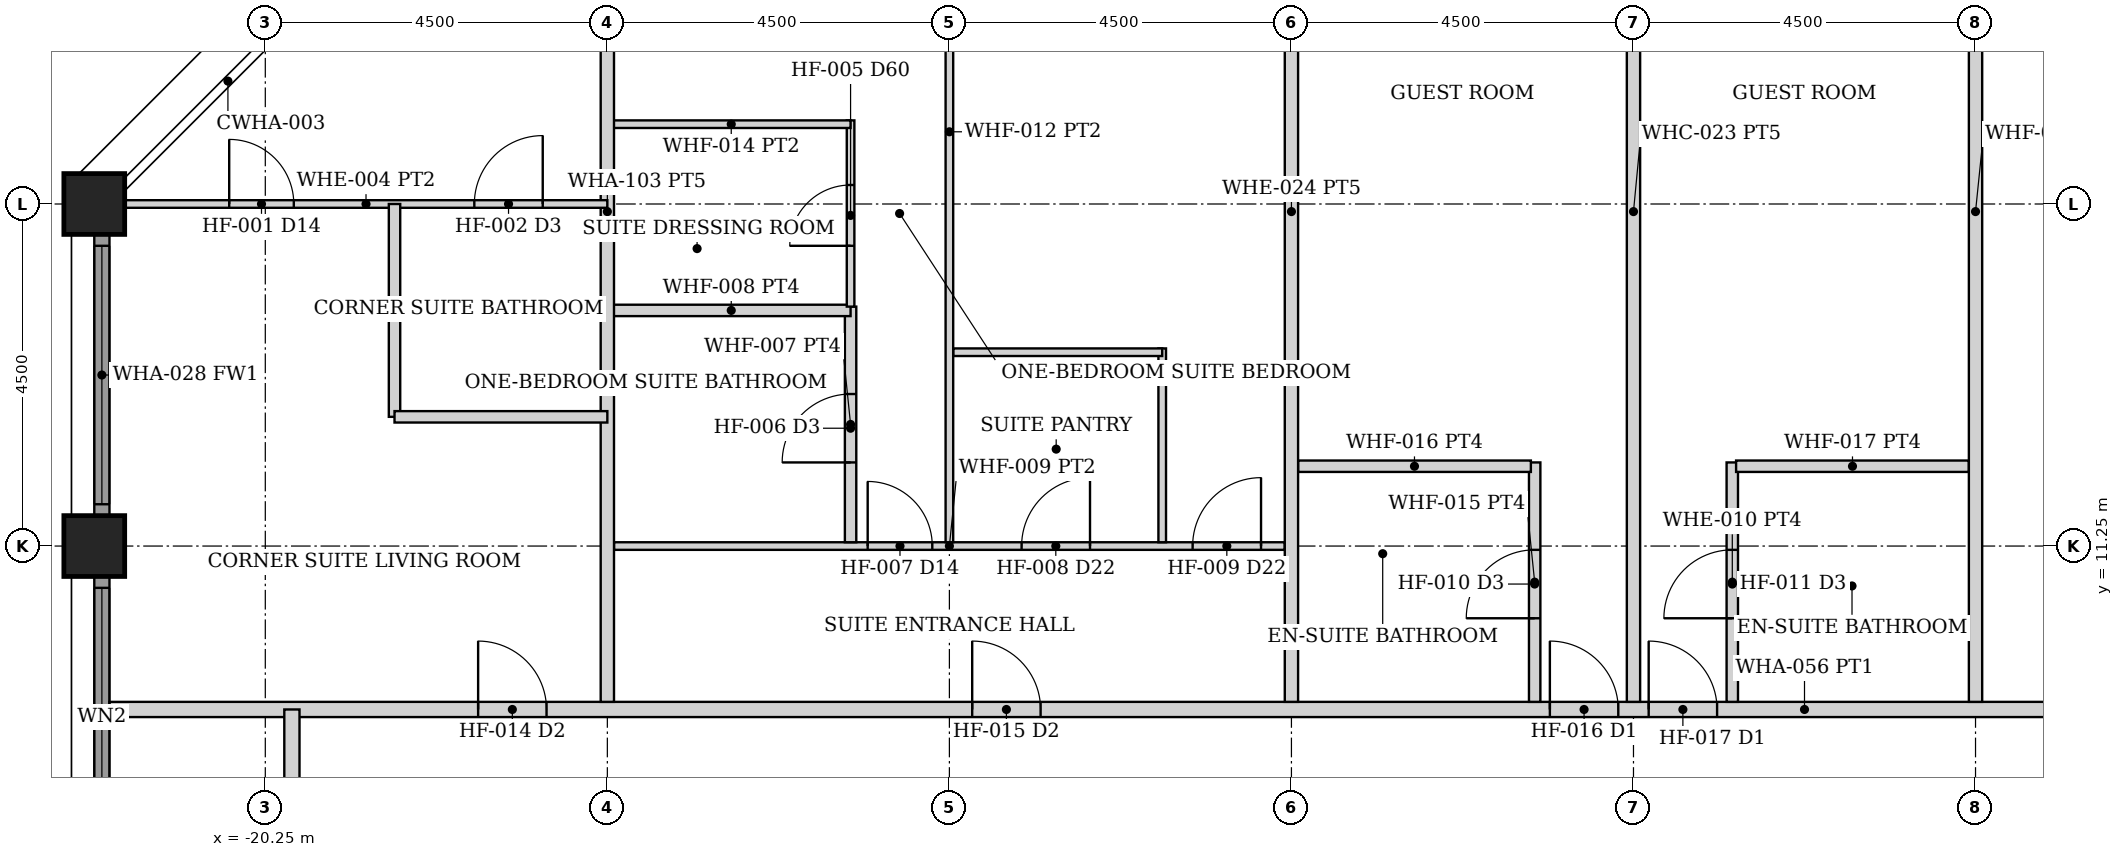
"""IFC4 building model, lengths in metres.
Left out: names, types, materials, properties, quantities, classifications, styles, units other than length and angle.
Written with IfcOpenShell. Run it as: python <this file> out.ifc"""

import sys

from ifc_helpers import new_model, si_unit, direction, frame, frame_2d, origin, origin_2d, place, context, subcontext, project, spatial, rectangle, hollow_rectangle, extrude, element, fill, save


model = new_model("IFC4")
c1 = context("Model", 3, precision=1e-05, world=origin(), true_north=direction((0.0, 1.0)))
c2 = subcontext(c1, "Body", "Model", "MODEL_VIEW")
j1 = project(units=[si_unit("LENGTHUNIT", "METRE"), si_unit("PLANEANGLEUNIT", "RADIAN")], contexts=[c1])
p1 = place(None, origin())
s1 = spatial("IfcSite", under=j1, at=p1, CompositionType="ELEMENT")
p2 = place(p1, origin())
s2 = spatial("IfcBuilding", under=s1, at=p2, CompositionType="ELEMENT")
p3 = place(p2, frame((0.0, 0.0, 172.4)))
s3 = spatial("IfcBuildingStorey", under=s2, at=p3, CompositionType="ELEMENT", Elevation=172.4)
for number, where, z_axis, x_axis in (
    (1, (-22.5, 11.25, 0.0), (0.0, 0.0, 1.0), (1.0, 0.0, 0.0)),
    (2, (-22.5, 15.75, 0.0), (0.0, 0.0, 1.0), (1.0, 0.0, 0.0)),
):
    element("IfcColumn", number, at=place(p3, frame(where, z_axis=z_axis, x_axis=x_axis)), inside=s3, PredefinedType="COLUMN", context=c2, shape_type="SweptSolid", body=[
        extrude(hollow_rectangle(XDim=0.8, YDim=0.8, WallThickness=0.045, at=origin_2d()), origin(), (0.0, 0.0, 1.0), 3.6),
    ])
p4 = place(p3, frame((-22.4, 7.155, 0.0), z_axis=(0.0, 0.0, 1.0), x_axis=(0.0, 1.0, 0.0)))
e3 = element("IfcWall", 3, at=p4, inside=s3, PredefinedType="SOLIDWALL", context=c2, shape_type="SweptSolid", body=[
    extrude(rectangle(XDim=3.69, YDim=0.2, at=frame_2d((1.845, 0.0))), origin(), (0.0, 0.0, 1.0), 2.479),
])
p5 = place(p4, frame((0.145, 0.0, 0.3)))
e4 = element("IfcOpeningElement", 4, at=p5, cuts=e3, PredefinedType="OPENING", context=c2, shape_type="SweptSolid", body=[
    extrude(rectangle(XDim=3.4, YDim=2.029, at=frame_2d((1.7, 1.015))), frame((0.0, 0.11, 0.0), z_axis=(0.0, -1.0, 0.0), x_axis=(1.0, 0.0, 0.0)), (0.0, 0.0, 1.0), 0.22),
])
p6 = place(p3, frame((-22.4, 11.655, 0.0), z_axis=(0.0, 0.0, 1.0), x_axis=(0.0, 1.0, 0.0)))
e5 = element("IfcWall", 5, at=p6, inside=s3, PredefinedType="SOLIDWALL", context=c2, shape_type="SweptSolid", body=[
    extrude(rectangle(XDim=3.69, YDim=0.2, at=frame_2d((1.845, 0.0))), origin(), (0.0, 0.0, 1.0), 2.479),
])
p7 = place(p6, frame((0.145, 0.0, 0.3)))
e6 = element("IfcOpeningElement", 6, at=p7, cuts=e5, PredefinedType="OPENING", context=c2, shape_type="SweptSolid", body=[
    extrude(rectangle(XDim=3.4, YDim=2.029, at=frame_2d((1.7, 1.015))), frame((0.0, 0.11, 0.0), z_axis=(0.0, -1.0, 0.0), x_axis=(1.0, 0.0, 0.0)), (0.0, 0.0, 1.0), 0.22),
])
p8 = place(p3, frame((-22.3, 9.1, 0.0), z_axis=(0.0, 0.0, 1.0), x_axis=(1.0, 0.0, 0.0)))
e7 = element("IfcWall", 7, at=p8, inside=s3, PredefinedType="PARTITIONING", context=c2, shape_type="SweptSolid", body=[
    extrude(rectangle(XDim=44.6, YDim=0.2, at=frame_2d((22.3, 0.0))), origin(), (0.0, 0.0, 1.0), 2.473),
])
p9 = place(p8, frame((11.35, 0.0, 0.0)))
e8 = element("IfcOpeningElement", 8, at=p9, cuts=e7, PredefinedType="OPENING", context=c2, shape_type="SweptSolid", body=[
    extrude(rectangle(XDim=0.9, YDim=2.1, at=frame_2d((0.45, 1.05))), frame((0.0, 0.11, 0.0), z_axis=(0.0, -1.0, 0.0), x_axis=(1.0, 0.0, 0.0)), (0.0, 0.0, 1.0), 0.22),
])
p10 = place(p8, frame((18.95, 0.0, 0.0)))
e9 = element("IfcOpeningElement", 9, at=p10, cuts=e7, PredefinedType="OPENING", context=c2, shape_type="SweptSolid", body=[
    extrude(rectangle(XDim=0.9, YDim=2.1, at=frame_2d((0.45, 1.05))), frame((0.0, 0.11, 0.0), z_axis=(0.0, -1.0, 0.0), x_axis=(1.0, 0.0, 0.0)), (0.0, 0.0, 1.0), 0.22),
])
p11 = place(p8, frame((20.25, 0.0, 0.0)))
e10 = element("IfcOpeningElement", 10, at=p11, cuts=e7, PredefinedType="OPENING", context=c2, shape_type="SweptSolid", body=[
    extrude(rectangle(XDim=0.9, YDim=2.1, at=frame_2d((0.45, 1.05))), frame((0.0, 0.11, 0.0), z_axis=(0.0, -1.0, 0.0), x_axis=(1.0, 0.0, 0.0)), (0.0, 0.0, 1.0), 0.22),
])
p12 = place(p8, frame((32.45, 0.0, 0.0)))
e11 = element("IfcOpeningElement", 11, at=p12, cuts=e7, PredefinedType="OPENING", context=c2, shape_type="SweptSolid", body=[
    extrude(rectangle(XDim=0.9, YDim=2.1, at=frame_2d((0.45, 1.05))), frame((0.0, 0.11, 0.0), z_axis=(0.0, -1.0, 0.0), x_axis=(1.0, 0.0, 0.0)), (0.0, 0.0, 1.0), 0.22),
])
p13 = place(p8, frame((36.95, 0.0, 0.0)))
e12 = element("IfcOpeningElement", 12, at=p13, cuts=e7, PredefinedType="OPENING", context=c2, shape_type="SweptSolid", body=[
    extrude(rectangle(XDim=0.9, YDim=2.1, at=frame_2d((0.45, 1.05))), frame((0.0, 0.11, 0.0), z_axis=(0.0, -1.0, 0.0), x_axis=(1.0, 0.0, 0.0)), (0.0, 0.0, 1.0), 0.22),
])
p14 = place(p8, frame((38.85, 0.0, 0.0)))
e13 = element("IfcOpeningElement", 13, at=p14, cuts=e7, PredefinedType="OPENING", context=c2, shape_type="SweptSolid", body=[
    extrude(rectangle(XDim=0.9, YDim=2.1, at=frame_2d((0.45, 1.05))), frame((0.0, 0.11, 0.0), z_axis=(0.0, -1.0, 0.0), x_axis=(1.0, 0.0, 0.0)), (0.0, 0.0, 1.0), 0.22),
])
p15 = place(p8, frame((4.85, 0.0, 0.0)))
e14 = element("IfcOpeningElement", 14, at=p15, cuts=e7, PredefinedType="OPENING", context=c2, shape_type="SweptSolid", body=[
    extrude(rectangle(XDim=0.9, YDim=2.1, at=frame_2d((0.45, 1.05))), frame((0.0, 0.11, 0.0), z_axis=(0.0, -1.0, 0.0), x_axis=(1.0, 0.0, 0.0)), (0.0, 0.0, 1.0), 0.22),
])
p16 = place(p3, frame((-19.9, 2.2, 0.0), z_axis=(0.0, 0.0, 1.0), x_axis=(0.0, 1.0, 0.0)))
e15 = element("IfcWall", 15, at=p16, inside=s3, PredefinedType="PARTITIONING", context=c2, shape_type="SweptSolid", body=[
    extrude(rectangle(XDim=6.9, YDim=0.2, at=frame_2d((3.45, 0.0))), origin(), (0.0, 0.0, 1.0), 2.473),
])
p17 = place(p16, frame((2.925, 0.0, 0.0)))
e16 = element("IfcOpeningElement", 16, at=p17, cuts=e15, PredefinedType="OPENING", context=c2, shape_type="SweptSolid", body=[
    extrude(rectangle(XDim=1.0, YDim=2.1, at=frame_2d((0.5, 1.05))), frame((0.0, 0.11, 0.0), z_axis=(0.0, -1.0, 0.0), x_axis=(1.0, 0.0, 0.0)), (0.0, 0.0, 1.0), 0.22),
])
p18 = place(p3, frame((-15.663, 11.25, 0.0), z_axis=(0.0, 0.0, 1.0), x_axis=(1.0, 0.0, 0.0)))
e17 = element("IfcWall", 17, at=p18, inside=s3, PredefinedType="PARTITIONING", context=c2, shape_type="SweptSolid", body=[
    extrude(rectangle(XDim=8.825, YDim=0.1, at=frame_2d((4.413, 0.0))), origin(), (0.0, 0.0, 1.0), 2.473),
])
p19 = place(p18, frame((5.363, 0.0, 0.0)))
e18 = element("IfcOpeningElement", 18, at=p19, cuts=e17, PredefinedType="OPENING", context=c2, shape_type="SweptSolid", body=[
    extrude(rectangle(XDim=0.9, YDim=2.1, at=frame_2d((0.45, 1.05))), frame((0.0, 0.06, 0.0), z_axis=(0.0, -1.0, 0.0), x_axis=(1.0, 0.0, 0.0)), (0.0, 0.0, 1.0), 0.12),
])
p20 = place(p18, frame((7.613, 0.0, 0.0)))
e19 = element("IfcOpeningElement", 19, at=p20, cuts=e17, PredefinedType="OPENING", context=c2, shape_type="SweptSolid", body=[
    extrude(rectangle(XDim=0.9, YDim=2.1, at=frame_2d((0.45, 1.05))), frame((0.0, 0.06, 0.0), z_axis=(0.0, -1.0, 0.0), x_axis=(1.0, 0.0, 0.0)), (0.0, 0.0, 1.0), 0.12),
])
p21 = place(p18, frame((3.337, 0.0, 0.0)))
e20 = element("IfcOpeningElement", 20, at=p21, cuts=e17, PredefinedType="OPENING", context=c2, shape_type="SweptSolid", body=[
    extrude(rectangle(XDim=0.85, YDim=2.1, at=frame_2d((0.425, 1.05))), frame((0.0, 0.06, 0.0), z_axis=(0.0, -1.0, 0.0), x_axis=(1.0, 0.0, 0.0)), (0.0, 0.0, 1.0), 0.12),
])
p22 = place(p3, frame((-8.45, 11.3, 0.0), z_axis=(0.0, 0.0, 1.0), x_axis=(0.0, 1.0, 0.0)))
e21 = element("IfcWall", 21, at=p22, inside=s3, PredefinedType="PARTITIONING", context=c2, shape_type="SweptSolid", body=[
    extrude(rectangle(XDim=2.55, YDim=0.1, at=frame_2d((1.275, 0.0))), origin(), (0.0, 0.0, 1.0), 2.473),
])
p23 = place(p3, frame((-11.2, 13.8, 0.0), z_axis=(0.0, 0.0, 1.0), x_axis=(1.0, 0.0, 0.0)))
e22 = element("IfcWall", 22, at=p23, inside=s3, PredefinedType="PARTITIONING", context=c2, shape_type="SweptSolid", body=[
    extrude(rectangle(XDim=2.75, YDim=0.1, at=frame_2d((1.375, 0.0))), origin(), (0.0, 0.0, 1.0), 2.473),
])
p24 = place(p3, frame((-11.25, 11.3, 0.0), z_axis=(0.0, 0.0, 1.0), x_axis=(0.0, 1.0, 0.0)))
e23 = element("IfcWall", 23, at=p24, inside=s3, PredefinedType="PARTITIONING", context=c2, shape_type="SweptSolid", body=[
    extrude(rectangle(XDim=10.8, YDim=0.1, at=frame_2d((5.4, 0.0))), origin(), (0.0, 0.0, 1.0), 2.473),
])
p25 = place(p3, frame((-12.55, 11.3, 0.0), z_axis=(0.0, 0.0, 1.0), x_axis=(0.0, 1.0, 0.0)))
e24 = element("IfcWall", 24, at=p25, inside=s3, PredefinedType="PARTITIONING", context=c2, shape_type="SweptSolid", body=[
    extrude(rectangle(XDim=3.1, YDim=0.15, at=frame_2d((1.55, 0.0))), origin(), (0.0, 0.0, 1.0), 2.473),
])
p26 = place(p25, frame((1.05, 0.0, 0.0)))
e25 = element("IfcOpeningElement", 25, at=p26, cuts=e24, PredefinedType="OPENING", context=c2, shape_type="SweptSolid", body=[
    extrude(rectangle(XDim=0.9, YDim=2.1, at=frame_2d((0.45, 1.05))), frame((0.0, 0.085, 0.0), z_axis=(0.0, -1.0, 0.0), x_axis=(1.0, 0.0, 0.0)), (0.0, 0.0, 1.0), 0.17),
])
p27 = place(p3, frame((-15.69, 14.35, 0.0), z_axis=(0.0, 0.0, 1.0), x_axis=(1.0, 0.0, 0.0)))
e26 = element("IfcWall", 26, at=p27, inside=s3, PredefinedType="PARTITIONING", context=c2, shape_type="SweptSolid", body=[
    extrude(rectangle(XDim=3.14, YDim=0.15, at=frame_2d((1.57, 0.0))), origin(), (0.0, 0.0, 1.0), 2.473),
])
p28 = place(p3, frame((-12.55, 14.4, 0.0), z_axis=(0.0, 0.0, 1.0), x_axis=(0.0, 1.0, 0.0)))
e27 = element("IfcWall", 27, at=p28, inside=s3, PredefinedType="PARTITIONING", context=c2, shape_type="SweptSolid", body=[
    extrude(rectangle(XDim=2.45, YDim=0.1, at=frame_2d((1.225, 0.0))), origin(), (0.0, 0.0, 1.0), 2.473),
])
p29 = place(p28, frame((0.8, 0.0, 0.0)))
e28 = element("IfcOpeningElement", 28, at=p29, cuts=e27, PredefinedType="OPENING", context=c2, shape_type="SweptSolid", body=[
    extrude(rectangle(XDim=0.8, YDim=2.1, at=frame_2d((0.4, 1.05))), frame((0.0, 0.06, 0.0), z_axis=(0.0, -1.0, 0.0), x_axis=(1.0, 0.0, 0.0)), (0.0, 0.0, 1.0), 0.12),
])
p30 = place(p3, frame((-15.69, 16.8, 0.0), z_axis=(0.0, 0.0, 1.0), x_axis=(1.0, 0.0, 0.0)))
e29 = element("IfcWall", 29, at=p30, inside=s3, PredefinedType="PARTITIONING", context=c2, shape_type="SweptSolid", body=[
    extrude(rectangle(XDim=3.14, YDim=0.1, at=frame_2d((1.57, 0.0))), origin(), (0.0, 0.0, 1.0), 2.473),
])
p31 = place(p3, frame((-3.55, 9.2, 0.0), z_axis=(0.0, 0.0, 1.0), x_axis=(0.0, 1.0, 0.0)))
e30 = element("IfcWall", 30, at=p31, inside=s3, PredefinedType="PARTITIONING", context=c2, shape_type="SweptSolid", body=[
    extrude(rectangle(XDim=3.15, YDim=0.15, at=frame_2d((1.575, 0.0))), origin(), (0.0, 0.0, 1.0), 2.473),
])
p32 = place(p31, frame((1.1, 0.0, 0.0)))
e31 = element("IfcOpeningElement", 31, at=p32, cuts=e30, PredefinedType="OPENING", context=c2, shape_type="SweptSolid", body=[
    extrude(rectangle(XDim=0.9, YDim=2.1, at=frame_2d((0.45, 1.05))), frame((0.0, 0.085, 0.0), z_axis=(0.0, -1.0, 0.0), x_axis=(1.0, 0.0, 0.0)), (0.0, 0.0, 1.0), 0.17),
])
p33 = place(p3, frame((-6.663, 12.3, 0.0), z_axis=(0.0, 0.0, 1.0), x_axis=(1.0, 0.0, 0.0)))
e32 = element("IfcWall", 32, at=p33, inside=s3, PredefinedType="PARTITIONING", context=c2, shape_type="SweptSolid", body=[
    extrude(rectangle(XDim=3.062, YDim=0.15, at=frame_2d((1.531, 0.0))), origin(), (0.0, 0.0, 1.0), 2.473),
])
p34 = place(p3, frame((-0.95, 9.2, 0.0), z_axis=(0.0, 0.0, 1.0), x_axis=(0.0, 1.0, 0.0)))
e33 = element("IfcWall", 33, at=p34, inside=s3, PredefinedType="PARTITIONING", context=c2, shape_type="SweptSolid", body=[
    extrude(rectangle(XDim=3.15, YDim=0.15, at=frame_2d((1.575, 0.0))), origin(), (0.0, 0.0, 1.0), 2.473),
])
p35 = place(p34, frame((1.1, 0.0, 0.0)))
e34 = element("IfcOpeningElement", 34, at=p35, cuts=e33, PredefinedType="OPENING", context=c2, shape_type="SweptSolid", body=[
    extrude(rectangle(XDim=0.9, YDim=2.1, at=frame_2d((0.45, 1.05))), frame((0.0, 0.085, 0.0), z_axis=(0.0, -1.0, 0.0), x_axis=(1.0, 0.0, 0.0)), (0.0, 0.0, 1.0), 0.17),
])
p36 = place(p3, frame((-0.9, 12.3, 0.0), z_axis=(0.0, 0.0, 1.0), x_axis=(1.0, 0.0, 0.0)))
e35 = element("IfcWall", 35, at=p36, inside=s3, PredefinedType="PARTITIONING", context=c2, shape_type="SweptSolid", body=[
    extrude(rectangle(XDim=3.062, YDim=0.15, at=frame_2d((1.531, 0.0))), origin(), (0.0, 0.0, 1.0), 2.473),
])
for number, where, z_axis, x_axis in (
    (36, (-15.75, 9.2, 0.0), (0.0, 0.0, 1.0), (0.0, 1.0, 0.0)),
    (37, (-6.75, 9.2, 0.0), (0.0, 0.0, 1.0), (0.0, 1.0, 0.0)),
    (38, (-2.25, 9.2, 0.0), (0.0, 0.0, 1.0), (0.0, 1.0, 0.0)),
    (39, (2.25, 9.2, 0.0), (0.0, 0.0, 1.0), (0.0, 1.0, 0.0)),
):
    element("IfcWall", number, at=place(p3, frame(where, z_axis=z_axis, x_axis=x_axis)), inside=s3, PredefinedType="PARTITIONING", context=c2, shape_type="SweptSolid", body=[
        extrude(rectangle(XDim=12.9, YDim=0.175, at=frame_2d((6.45, 0.0))), origin(), (0.0, 0.0, 1.0), 2.473),
    ])
p37 = place(p3, frame((-22.1, 15.75, 0.0), z_axis=(0.0, 0.0, 1.0), x_axis=(1.0, 0.0, 0.0)))
e40 = element("IfcWall", 40, at=p37, inside=s3, PredefinedType="PARTITIONING", context=c2, shape_type="SweptSolid", body=[
    extrude(rectangle(XDim=6.35, YDim=0.1, at=frame_2d((3.175, 0.0))), origin(), (0.0, 0.0, 1.0), 2.473),
])
p38 = place(p37, frame((1.375, 0.0, 0.0)))
e41 = element("IfcOpeningElement", 41, at=p38, cuts=e40, PredefinedType="OPENING", context=c2, shape_type="SweptSolid", body=[
    extrude(rectangle(XDim=0.85, YDim=2.1, at=frame_2d((0.425, 1.05))), frame((0.0, 0.06, 0.0), z_axis=(0.0, -1.0, 0.0), x_axis=(1.0, 0.0, 0.0)), (0.0, 0.0, 1.0), 0.12),
])
p39 = place(p37, frame((4.6, 0.0, 0.0)))
e42 = element("IfcOpeningElement", 42, at=p39, cuts=e40, PredefinedType="OPENING", context=c2, shape_type="SweptSolid", body=[
    extrude(rectangle(XDim=0.9, YDim=2.1, at=frame_2d((0.45, 1.05))), frame((0.0, 0.06, 0.0), z_axis=(0.0, -1.0, 0.0), x_axis=(1.0, 0.0, 0.0)), (0.0, 0.0, 1.0), 0.12),
])
for number, where, z_axis, x_axis in (
    (43, (-18.55, 12.95, 0.0), (0.0, 0.0, 1.0), (0.0, 1.0, 0.0)),
    (44, (-18.55, 12.95, 0.0), (0.0, 0.0, 1.0), (1.0, 0.0, 0.0)),
):
    element("IfcWall", number, at=place(p3, frame(where, z_axis=z_axis, x_axis=x_axis)), inside=s3, PredefinedType="PARTITIONING", context=c2, shape_type="SweptSolid", body=[
        extrude(rectangle(XDim=2.8, YDim=0.15, at=frame_2d((1.4, 0.0))), origin(), (0.0, 0.0, 1.0), 2.473),
    ])
p40 = place(p5, origin())
e45 = element("IfcWindow", 45, at=p40, inside=s3, PartitioningType="SINGLE_PANEL", PredefinedType="WINDOW", context=c2, shape_type="SweptSolid", body=[
    extrude(rectangle(XDim=3.4, YDim=2.029, at=frame_2d((1.7, 1.015))), frame((0.0, 0.03, 0.0), z_axis=(0.0, -1.0, 0.0), x_axis=(1.0, 0.0, 0.0)), (0.0, 0.0, 1.0), 0.06),
])
fill(e4, e45)
p41 = place(p7, origin())
e46 = element("IfcWindow", 46, at=p41, inside=s3, PartitioningType="SINGLE_PANEL", PredefinedType="WINDOW", context=c2, shape_type="SweptSolid", body=[
    extrude(rectangle(XDim=3.4, YDim=2.029, at=frame_2d((1.7, 1.015))), frame((0.0, 0.03, 0.0), z_axis=(0.0, -1.0, 0.0), x_axis=(1.0, 0.0, 0.0)), (0.0, 0.0, 1.0), 0.06),
])
fill(e6, e46)
p42 = place(p9, origin())
e47 = element("IfcDoor", 47, at=p42, inside=s3, OperationType="SINGLE_SWING_LEFT", PredefinedType="DOOR", context=c2, shape_type="SweptSolid", body=[
    extrude(rectangle(XDim=0.9, YDim=2.1, at=frame_2d((0.45, 1.05))), frame((0.0, 0.025, 0.0), z_axis=(0.0, -1.0, 0.0), x_axis=(1.0, 0.0, 0.0)), (0.0, 0.0, 1.0), 0.05),
])
fill(e8, e47)
p43 = place(p19, origin())
e48 = element("IfcDoor", 48, at=p43, inside=s3, OperationType="SINGLE_SWING_RIGHT", PredefinedType="DOOR", context=c2, shape_type="SweptSolid", body=[
    extrude(rectangle(XDim=0.9, YDim=2.1, at=frame_2d((0.45, 1.05))), frame((0.0, 0.025, 0.0), z_axis=(0.0, -1.0, 0.0), x_axis=(1.0, 0.0, 0.0)), (0.0, 0.0, 1.0), 0.05),
])
fill(e18, e48)
p44 = place(p20, origin())
e49 = element("IfcDoor", 49, at=p44, inside=s3, OperationType="SINGLE_SWING_RIGHT", PredefinedType="DOOR", context=c2, shape_type="SweptSolid", body=[
    extrude(rectangle(XDim=0.9, YDim=2.1, at=frame_2d((0.45, 1.05))), frame((0.0, 0.025, 0.0), z_axis=(0.0, -1.0, 0.0), x_axis=(1.0, 0.0, 0.0)), (0.0, 0.0, 1.0), 0.05),
])
fill(e19, e49)
p45 = place(p21, origin())
e50 = element("IfcDoor", 50, at=p45, inside=s3, OperationType="SINGLE_SWING_LEFT", PredefinedType="DOOR", context=c2, shape_type="SweptSolid", body=[
    extrude(rectangle(XDim=0.85, YDim=2.1, at=frame_2d((0.425, 1.05))), frame((0.0, 0.025, 0.0), z_axis=(0.0, -1.0, 0.0), x_axis=(1.0, 0.0, 0.0)), (0.0, 0.0, 1.0), 0.05),
])
fill(e20, e50)
p46 = place(p26, origin())
e51 = element("IfcDoor", 51, at=p46, inside=s3, OperationType="SINGLE_SWING_LEFT", PredefinedType="DOOR", context=c2, shape_type="SweptSolid", body=[
    extrude(rectangle(XDim=0.9, YDim=2.1, at=frame_2d((0.45, 1.05))), frame((0.0, 0.025, 0.0), z_axis=(0.0, -1.0, 0.0), x_axis=(1.0, 0.0, 0.0)), (0.0, 0.0, 1.0), 0.05),
])
fill(e25, e51)
p47 = place(p29, origin())
e52 = element("IfcDoor", 52, at=p47, inside=s3, OperationType="SINGLE_SWING_LEFT", PredefinedType="DOOR", context=c2, shape_type="SweptSolid", body=[
    extrude(rectangle(XDim=0.8, YDim=2.1, at=frame_2d((0.4, 1.05))), frame((0.0, 0.025, 0.0), z_axis=(0.0, -1.0, 0.0), x_axis=(1.0, 0.0, 0.0)), (0.0, 0.0, 1.0), 0.05),
])
fill(e28, e52)
p48 = place(p10, origin())
e53 = element("IfcDoor", 53, at=p48, inside=s3, OperationType="SINGLE_SWING_LEFT", PredefinedType="DOOR", context=c2, shape_type="SweptSolid", body=[
    extrude(rectangle(XDim=0.9, YDim=2.1, at=frame_2d((0.45, 1.05))), frame((0.0, 0.025, 0.0), z_axis=(0.0, -1.0, 0.0), x_axis=(1.0, 0.0, 0.0)), (0.0, 0.0, 1.0), 0.05),
])
fill(e9, e53)
p49 = place(p32, origin())
e54 = element("IfcDoor", 54, at=p49, inside=s3, OperationType="SINGLE_SWING_LEFT", PredefinedType="DOOR", context=c2, shape_type="SweptSolid", body=[
    extrude(rectangle(XDim=0.9, YDim=2.1, at=frame_2d((0.45, 1.05))), frame((0.0, 0.025, 0.0), z_axis=(0.0, -1.0, 0.0), x_axis=(1.0, 0.0, 0.0)), (0.0, 0.0, 1.0), 0.05),
])
fill(e31, e54)
p50 = place(p11, origin())
e55 = element("IfcDoor", 55, at=p50, inside=s3, OperationType="SINGLE_SWING_LEFT", PredefinedType="DOOR", context=c2, shape_type="SweptSolid", body=[
    extrude(rectangle(XDim=0.9, YDim=2.1, at=frame_2d((0.45, 1.05))), frame((0.0, 0.025, 0.0), z_axis=(0.0, -1.0, 0.0), x_axis=(1.0, 0.0, 0.0)), (0.0, 0.0, 1.0), 0.05),
])
fill(e10, e55)
p51 = place(p35, origin())
e56 = element("IfcDoor", 56, at=p51, inside=s3, OperationType="SINGLE_SWING_LEFT", PredefinedType="DOOR", context=c2, shape_type="SweptSolid", body=[
    extrude(rectangle(XDim=0.9, YDim=2.1, at=frame_2d((0.45, 1.05))), frame((0.0, 0.025, 0.0), z_axis=(0.0, -1.0, 0.0), x_axis=(1.0, 0.0, 0.0)), (0.0, 0.0, 1.0), 0.05),
])
fill(e34, e56)
p52 = place(p15, origin())
e57 = element("IfcDoor", 57, at=p52, inside=s3, OperationType="SINGLE_SWING_LEFT", PredefinedType="DOOR", context=c2, shape_type="SweptSolid", body=[
    extrude(rectangle(XDim=0.9, YDim=2.1, at=frame_2d((0.45, 1.05))), frame((0.0, 0.025, 0.0), z_axis=(0.0, -1.0, 0.0), x_axis=(1.0, 0.0, 0.0)), (0.0, 0.0, 1.0), 0.05),
])
fill(e14, e57)
p53 = place(p38, origin())
e58 = element("IfcDoor", 58, at=p53, inside=s3, OperationType="SINGLE_SWING_LEFT", PredefinedType="DOOR", context=c2, shape_type="SweptSolid", body=[
    extrude(rectangle(XDim=0.85, YDim=2.1, at=frame_2d((0.425, 1.05))), frame((0.0, 0.025, 0.0), z_axis=(0.0, -1.0, 0.0), x_axis=(1.0, 0.0, 0.0)), (0.0, 0.0, 1.0), 0.05),
])
fill(e41, e58)
p54 = place(p39, origin())
e59 = element("IfcDoor", 59, at=p54, inside=s3, OperationType="SINGLE_SWING_RIGHT", PredefinedType="DOOR", context=c2, shape_type="SweptSolid", body=[
    extrude(rectangle(XDim=0.9, YDim=2.1, at=frame_2d((0.45, 1.05))), frame((0.0, 0.025, 0.0), z_axis=(0.0, -1.0, 0.0), x_axis=(1.0, 0.0, 0.0)), (0.0, 0.0, 1.0), 0.05),
])
fill(e42, e59)
save(model, sys.argv[1])
